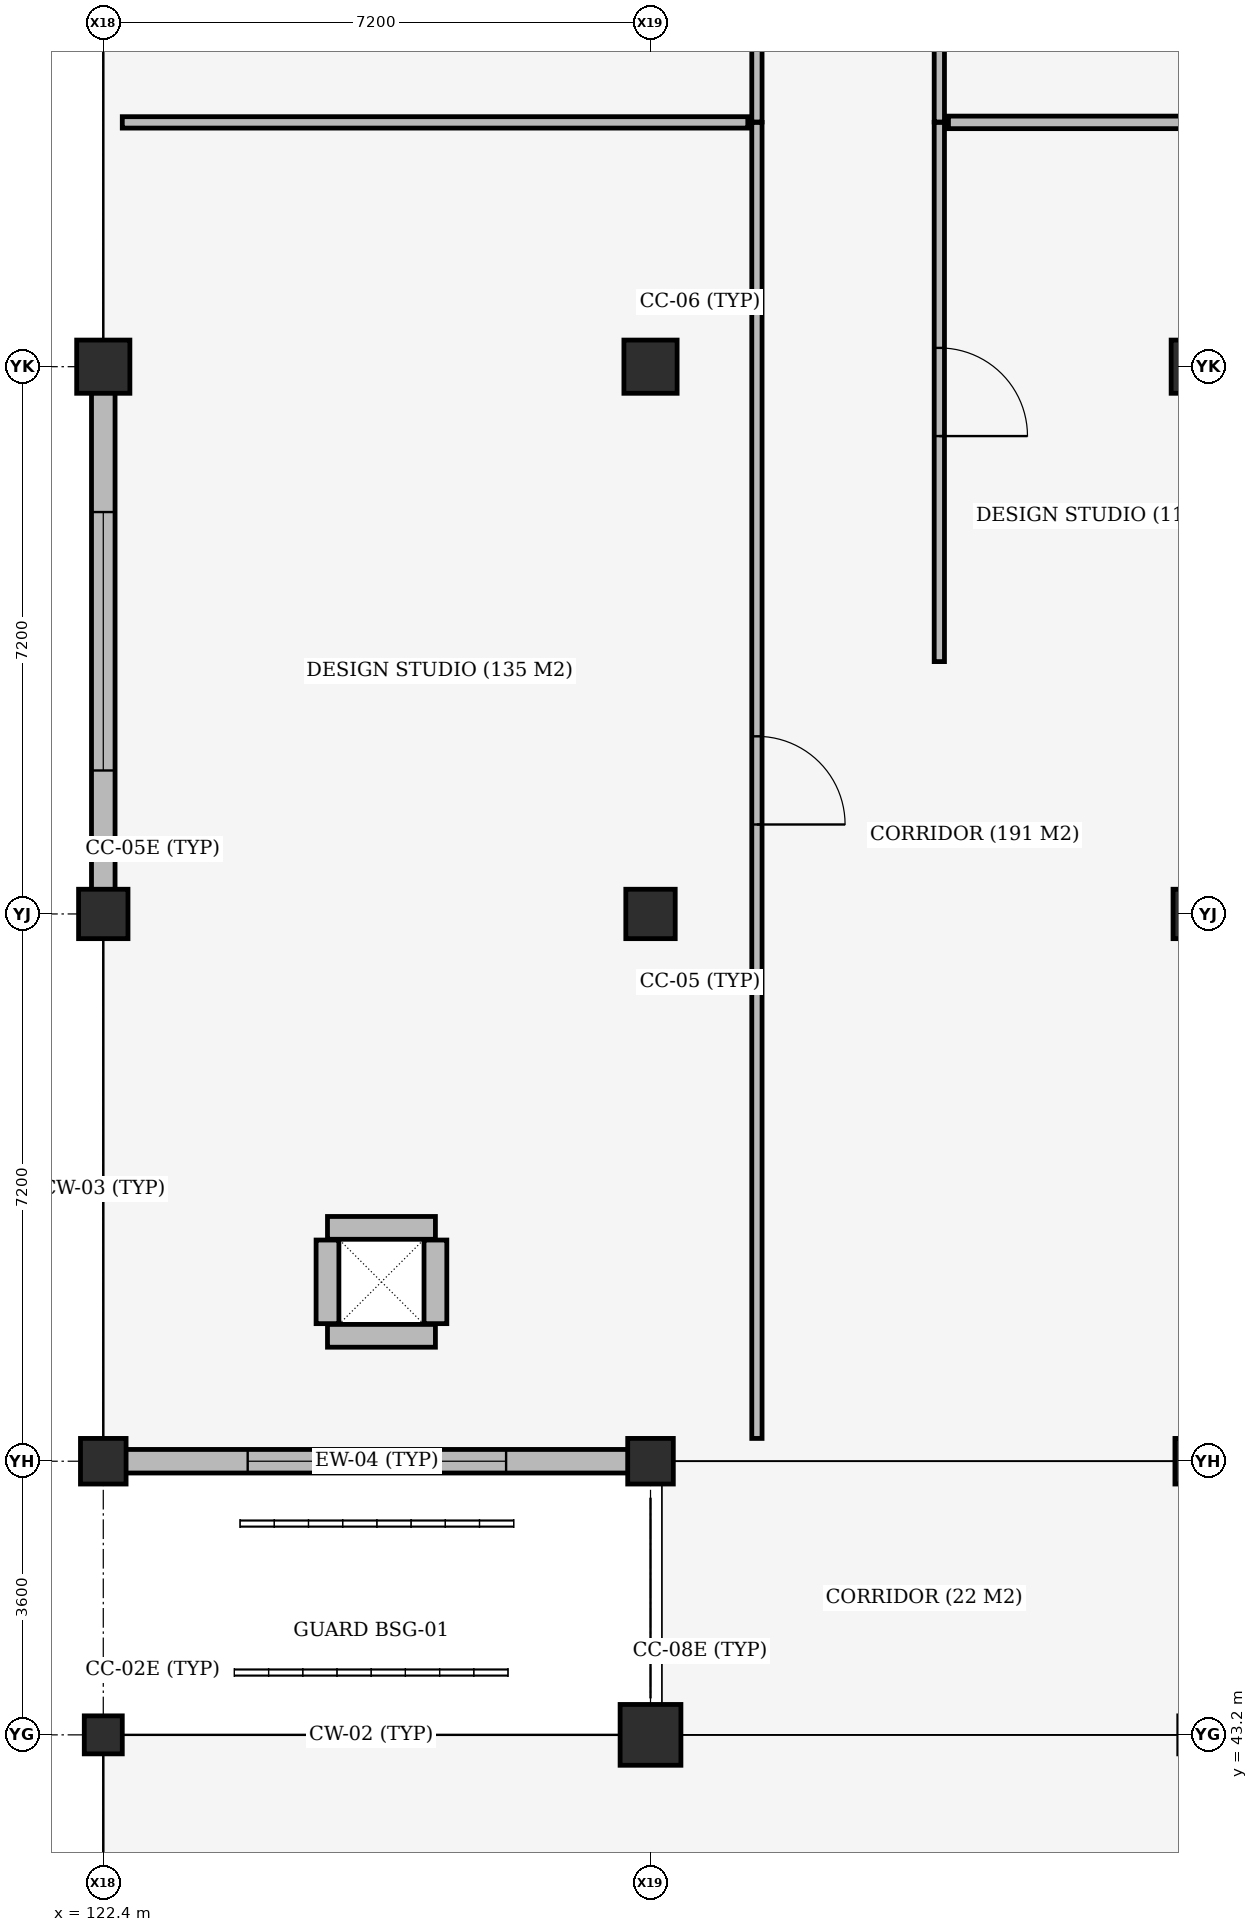
"""IFC4 building model, lengths in metres.
Left out: names, types, materials, properties, quantities, classifications, styles, units other than length and angle.
Written with IfcOpenShell. Run it as: python <this file> out.ifc"""

import sys

from ifc_helpers import new_model, si_unit, direction, frame, frame_2d, origin, origin_2d, place, context, subcontext, project, spatial, rectangle, extrude, element, fill, save


model = new_model("IFC4")
c1 = context("Model", 3, precision=1e-05, world=origin(), true_north=direction((0.0, 1.0)))
c2 = subcontext(c1, "Body", "Model", "MODEL_VIEW")
j1 = project(units=[si_unit("LENGTHUNIT", "METRE"), si_unit("PLANEANGLEUNIT", "RADIAN")], contexts=[c1])
p1 = place(None, origin())
s1 = spatial("IfcSite", under=j1, at=p1, CompositionType="ELEMENT")
p2 = place(p1, origin())
s2 = spatial("IfcBuilding", under=s1, at=p2, CompositionType="ELEMENT")
p3 = place(p2, frame((0.0, 0.0, 5.4)))
s3 = spatial("IfcBuildingStorey", under=s2, at=p3, CompositionType="ELEMENT", Elevation=5.4)
p4 = place(p3, frame((125.35, 48.45, 0.0), z_axis=(0.0, 0.0, 1.0), x_axis=(1.0, 0.0, 0.0)))
e1 = element("IfcWall", 1, at=p4, inside=s3, PredefinedType="SHEAR", context=c2, shape_type="SweptSolid", body=[
    extrude(rectangle(XDim=1.42, YDim=0.3, at=frame_2d((0.71, 0.0))), origin(), (0.0, 0.0, 1.0), 3.96),
])
p5 = place(p3, frame((126.77, 48.61, 0.0), z_axis=(0.0, 0.0, 1.0), x_axis=(0.0, 1.0, 0.0)))
e2 = element("IfcWall", 2, at=p5, inside=s3, PredefinedType="SHEAR", context=c2, shape_type="SweptSolid", body=[
    extrude(rectangle(XDim=1.1, YDim=0.3, at=frame_2d((0.55, 0.0))), origin(), (0.0, 0.0, 1.0), 3.96),
])
p6 = place(p3, frame((126.77, 49.87, 0.0), z_axis=(0.0, 0.0, 1.0), x_axis=(-1.0, 0.0, 0.0)))
e3 = element("IfcWall", 3, at=p6, inside=s3, PredefinedType="SHEAR", context=c2, shape_type="SweptSolid", body=[
    extrude(rectangle(XDim=1.42, YDim=0.3, at=frame_2d((0.71, 0.0))), origin(), (0.0, 0.0, 1.0), 3.96),
])
p7 = place(p3, frame((125.35, 49.71, 0.0), z_axis=(0.0, 0.0, 1.0), x_axis=(0.0, -1.0, 0.0)))
e4 = element("IfcWall", 4, at=p7, inside=s3, PredefinedType="SHEAR", context=c2, shape_type="SweptSolid", body=[
    extrude(rectangle(XDim=1.1, YDim=0.3, at=frame_2d((0.55, 0.0))), origin(), (0.0, 0.0, 1.0), 3.96),
])
p8 = place(p3, frame((122.4, 43.2, 0.0), z_axis=(0.0, 0.0, 1.0), x_axis=(1.0, 0.0, 0.0)))
e5 = element("IfcColumn", 5, at=p8, inside=s3, PredefinedType="COLUMN", context=c2, shape_type="SweptSolid", body=[
    extrude(rectangle(XDim=0.5, YDim=0.5, at=origin_2d()), origin(), (0.0, 0.0, 1.0), 3.85),
])
p9 = place(p3, frame((129.6, 43.2, 0.0), z_axis=(0.0, 0.0, 1.0), x_axis=(1.0, 0.0, 0.0)))
e6 = element("IfcColumn", 6, at=p9, inside=s3, PredefinedType="COLUMN", context=c2, shape_type="SweptSolid", body=[
    extrude(rectangle(XDim=0.8, YDim=0.8, at=origin_2d()), origin(), (0.0, 0.0, 1.0), 3.85),
])
p10 = place(p3, frame((122.4, 46.8, 0.0), z_axis=(0.0, 0.0, 1.0), x_axis=(1.0, 0.0, 0.0)))
e7 = element("IfcColumn", 7, at=p10, inside=s3, PredefinedType="COLUMN", context=c2, shape_type="SweptSolid", body=[
    extrude(rectangle(XDim=0.6, YDim=0.6, at=origin_2d()), origin(), (0.0, 0.0, 1.0), 3.92),
])
p11 = place(p3, frame((122.4, 54.0, 0.0), z_axis=(0.0, 0.0, 1.0), x_axis=(1.0, 0.0, 0.0)))
e8 = element("IfcColumn", 8, at=p11, inside=s3, PredefinedType="COLUMN", context=c2, shape_type="SweptSolid", body=[
    extrude(rectangle(XDim=0.65, YDim=0.65, at=origin_2d()), origin(), (0.0, 0.0, 1.0), 3.92),
])
p12 = place(p3, frame((122.4, 61.2, 0.0), z_axis=(0.0, 0.0, 1.0), x_axis=(1.0, 0.0, 0.0)))
e9 = element("IfcColumn", 9, at=p12, inside=s3, PredefinedType="COLUMN", context=c2, shape_type="SweptSolid", body=[
    extrude(rectangle(XDim=0.7, YDim=0.7, at=origin_2d()), origin(), (0.0, 0.0, 1.0), 3.92),
])
p13 = place(p3, frame((129.6, 46.8, 0.0), z_axis=(0.0, 0.0, 1.0), x_axis=(1.0, 0.0, 0.0)))
e10 = element("IfcColumn", 10, at=p13, inside=s3, PredefinedType="COLUMN", context=c2, shape_type="SweptSolid", body=[
    extrude(rectangle(XDim=0.6, YDim=0.6, at=origin_2d()), origin(), (0.0, 0.0, 1.0), 3.92),
])
p14 = place(p3, frame((129.6, 54.0, 0.0), z_axis=(0.0, 0.0, 1.0), x_axis=(1.0, 0.0, 0.0)))
e11 = element("IfcColumn", 11, at=p14, inside=s3, PredefinedType="COLUMN", context=c2, shape_type="SweptSolid", body=[
    extrude(rectangle(XDim=0.65, YDim=0.65, at=origin_2d()), origin(), (0.0, 0.0, 1.0), 3.92),
])
p15 = place(p3, frame((129.6, 61.2, 0.0), z_axis=(0.0, 0.0, 1.0), x_axis=(1.0, 0.0, 0.0)))
e12 = element("IfcColumn", 12, at=p15, inside=s3, PredefinedType="COLUMN", context=c2, shape_type="SweptSolid", body=[
    extrude(rectangle(XDim=0.7, YDim=0.7, at=origin_2d()), origin(), (0.0, 0.0, 1.0), 3.92),
])
p16 = place(p3, frame((136.8, 46.8, 0.0), z_axis=(0.0, 0.0, 1.0), x_axis=(1.0, 0.0, 0.0)))
e13 = element("IfcColumn", 13, at=p16, inside=s3, PredefinedType="COLUMN", context=c2, shape_type="SweptSolid", body=[
    extrude(rectangle(XDim=0.6, YDim=0.6, at=origin_2d()), origin(), (0.0, 0.0, 1.0), 3.92),
])
p17 = place(p3, frame((136.8, 54.0, 0.0), z_axis=(0.0, 0.0, 1.0), x_axis=(1.0, 0.0, 0.0)))
e14 = element("IfcColumn", 14, at=p17, inside=s3, PredefinedType="COLUMN", context=c2, shape_type="SweptSolid", body=[
    extrude(rectangle(XDim=0.65, YDim=0.65, at=origin_2d()), origin(), (0.0, 0.0, 1.0), 3.92),
])
p18 = place(p3, frame((136.8, 61.2, 0.0), z_axis=(0.0, 0.0, 1.0), x_axis=(1.0, 0.0, 0.0)))
e15 = element("IfcColumn", 15, at=p18, inside=s3, PredefinedType="COLUMN", context=c2, shape_type="SweptSolid", body=[
    extrude(rectangle(XDim=0.7, YDim=0.7, at=origin_2d()), origin(), (0.0, 0.0, 1.0), 3.92),
])
p19 = place(p3, frame((129.308, 46.8, 0.0), z_axis=(0.0, 0.0, 1.0), x_axis=(-1.0, 0.0, 0.0)))
e16 = element("IfcWall", 16, at=p19, inside=s3, PredefinedType="STANDARD", context=c2, shape_type="SweptSolid", body=[
    extrude(rectangle(XDim=6.616, YDim=0.31, at=frame_2d((3.308, 0.0))), origin(), (0.0, 0.0, 1.0), 3.34),
])
p20 = place(p19, frame((1.608, 0.0, 0.9)))
e17 = element("IfcOpeningElement", 17, at=p20, cuts=e16, PredefinedType="OPENING", context=c2, shape_type="SweptSolid", body=[
    extrude(rectangle(XDim=3.4, YDim=1.5, at=frame_2d((1.7, 0.75))), frame((0.0, 0.165, 0.0), z_axis=(0.0, -1.0, 0.0), x_axis=(1.0, 0.0, 0.0)), (0.0, 0.0, 1.0), 0.33),
])
p21 = place(p3, frame((122.4, 54.317, 0.0), z_axis=(0.0, 0.0, 1.0), x_axis=(0.0, 1.0, 0.0)))
e18 = element("IfcWall", 18, at=p21, inside=s3, PredefinedType="STANDARD", context=c2, shape_type="SweptSolid", body=[
    extrude(rectangle(XDim=6.541, YDim=0.31, at=frame_2d((3.271, 0.0))), origin(), (0.0, 0.0, 1.0), 3.24),
])
p22 = place(p21, frame((1.571, 0.0, 0.9)))
e19 = element("IfcOpeningElement", 19, at=p22, cuts=e18, PredefinedType="OPENING", context=c2, shape_type="SweptSolid", body=[
    extrude(rectangle(XDim=3.4, YDim=1.5, at=frame_2d((1.7, 0.75))), frame((0.0, 0.165, 0.0), z_axis=(0.0, -1.0, 0.0), x_axis=(1.0, 0.0, 0.0)), (0.0, 0.0, 1.0), 0.33),
])
p23 = place(p3, frame((131.0, 47.1, 0.0), z_axis=(0.0, 0.0, 1.0), x_axis=(0.0, 1.0, 0.0)))
e20 = element("IfcWall", 20, at=p23, inside=s3, PredefinedType="PARTITIONING", context=c2, shape_type="SweptSolid", body=[
    extrude(rectangle(XDim=17.314, YDim=0.135, at=frame_2d((8.657, 0.0))), origin(), (0.0, 0.0, 1.0), 3.18),
])
p24 = place(p23, frame((8.077, 0.0, 0.0)))
e21 = element("IfcOpeningElement", 21, at=p24, cuts=e20, PredefinedType="OPENING", context=c2, shape_type="SweptSolid", body=[
    extrude(rectangle(XDim=1.16, YDim=2.2, at=frame_2d((0.58, 1.1))), frame((0.0, 0.077, 0.0), z_axis=(0.0, -1.0, 0.0), x_axis=(1.0, 0.0, 0.0)), (0.0, 0.0, 1.0), 0.155),
])
p25 = place(p3, frame((122.65, 64.414, 0.0), z_axis=(0.0, 0.0, 1.0), x_axis=(1.0, 0.0, 0.0)))
e22 = element("IfcWall", 22, at=p25, inside=s3, PredefinedType="PARTITIONING", context=c2, shape_type="SweptSolid", body=[
    extrude(rectangle(XDim=8.23, YDim=0.15, at=frame_2d((4.115, 0.0))), origin(), (0.0, 0.0, 1.0), 3.24),
])
p26 = place(p3, frame((131.0, 64.419, 0.0), z_axis=(0.0, 0.0, 1.0), x_axis=(0.0, 1.0, 0.0)))
e23 = element("IfcWall", 23, at=p26, inside=s3, PredefinedType="PARTITIONING", context=c2, shape_type="SweptSolid", body=[
    extrude(rectangle(XDim=4.976, YDim=0.135, at=frame_2d((2.488, 0.0))), origin(), (0.0, 0.0, 1.0), 3.24),
])
p27 = place(p26, frame((1.913, 0.0, 0.0)))
e24 = element("IfcOpeningElement", 24, at=p27, cuts=e23, PredefinedType="OPENING", context=c2, shape_type="SweptSolid", body=[
    extrude(rectangle(XDim=1.15, YDim=2.2, at=frame_2d((0.575, 1.1))), frame((0.0, 0.077, 0.0), z_axis=(0.0, -1.0, 0.0), x_axis=(1.0, 0.0, 0.0)), (0.0, 0.0, 1.0), 0.155),
])
p28 = place(p3, frame((133.4, 57.32, 0.0), z_axis=(0.0, 0.0, 1.0), x_axis=(0.0, 1.0, 0.0)))
e25 = element("IfcWall", 25, at=p28, inside=s3, PredefinedType="PARTITIONING", context=c2, shape_type="SweptSolid", body=[
    extrude(rectangle(XDim=7.094, YDim=0.135, at=frame_2d((3.547, 0.0))), origin(), (0.0, 0.0, 1.0), 3.34),
])
p29 = place(p28, frame((2.967, 0.0, 0.0)))
e26 = element("IfcOpeningElement", 26, at=p29, cuts=e25, PredefinedType="OPENING", context=c2, shape_type="SweptSolid", body=[
    extrude(rectangle(XDim=1.16, YDim=2.2, at=frame_2d((0.58, 1.1))), frame((0.0, 0.077, 0.0), z_axis=(0.0, -1.0, 0.0), x_axis=(1.0, 0.0, 0.0)), (0.0, 0.0, 1.0), 0.155),
])
p30 = place(p3, frame((133.52, 64.414, 0.0), z_axis=(0.0, 0.0, 1.0), x_axis=(1.0, 0.0, 0.0)))
e27 = element("IfcWall", 27, at=p30, inside=s3, PredefinedType="PARTITIONING", context=c2, shape_type="SweptSolid", body=[
    extrude(rectangle(XDim=26.16, YDim=0.165, at=frame_2d((13.08, 0.0))), origin(), (0.0, 0.0, 1.0), 3.34),
])
p31 = place(p3, frame((133.4, 64.419, 0.0), z_axis=(0.0, 0.0, 1.0), x_axis=(0.0, 1.0, 0.0)))
e28 = element("IfcWall", 28, at=p31, inside=s3, PredefinedType="PARTITIONING", context=c2, shape_type="SweptSolid", body=[
    extrude(rectangle(XDim=4.976, YDim=0.135, at=frame_2d((2.488, 0.0))), origin(), (0.0, 0.0, 1.0), 3.24),
])
p32 = place(p31, frame((1.913, 0.0, 0.0)))
e29 = element("IfcOpeningElement", 29, at=p32, cuts=e28, PredefinedType="OPENING", context=c2, shape_type="SweptSolid", body=[
    extrude(rectangle(XDim=1.15, YDim=2.2, at=frame_2d((0.575, 1.1))), frame((0.0, 0.077, 0.0), z_axis=(0.0, -1.0, 0.0), x_axis=(1.0, 0.0, 0.0)), (0.0, 0.0, 1.0), 0.155),
])
p33 = place(p20, origin())
e30 = element("IfcWindow", 30, at=p33, inside=s3, PartitioningType="DOUBLE_PANEL_VERTICAL", PredefinedType="WINDOW", context=c2, shape_type="SweptSolid", body=[
    extrude(rectangle(XDim=3.4, YDim=1.5, at=frame_2d((1.7, 0.75))), frame((0.0, 0.03, 0.0), z_axis=(0.0, -1.0, 0.0), x_axis=(1.0, 0.0, 0.0)), (0.0, 0.0, 1.0), 0.06),
])
fill(e17, e30)
p34 = place(p22, origin())
e31 = element("IfcWindow", 31, at=p34, inside=s3, PartitioningType="DOUBLE_PANEL_VERTICAL", PredefinedType="WINDOW", context=c2, shape_type="SweptSolid", body=[
    extrude(rectangle(XDim=3.4, YDim=1.5, at=frame_2d((1.7, 0.75))), frame((0.0, 0.03, 0.0), z_axis=(0.0, -1.0, 0.0), x_axis=(1.0, 0.0, 0.0)), (0.0, 0.0, 1.0), 0.06),
])
fill(e19, e31)
p35 = place(p24, origin())
e32 = element("IfcDoor", 32, at=p35, inside=s3, OperationType="SINGLE_SWING_RIGHT", PredefinedType="DOOR", context=c2, shape_type="SweptSolid", body=[
    extrude(rectangle(XDim=1.16, YDim=2.2, at=frame_2d((0.58, 1.1))), frame((0.0, 0.025, 0.0), z_axis=(0.0, -1.0, 0.0), x_axis=(1.0, 0.0, 0.0)), (0.0, 0.0, 1.0), 0.05),
])
fill(e21, e32)
p36 = place(p29, origin())
e33 = element("IfcDoor", 33, at=p36, inside=s3, OperationType="SINGLE_SWING_RIGHT", PredefinedType="DOOR", context=c2, shape_type="SweptSolid", body=[
    extrude(rectangle(XDim=1.16, YDim=2.2, at=frame_2d((0.58, 1.1))), frame((0.0, 0.025, 0.0), z_axis=(0.0, -1.0, 0.0), x_axis=(1.0, 0.0, 0.0)), (0.0, 0.0, 1.0), 0.05),
])
fill(e26, e33)
save(model, sys.argv[1])
